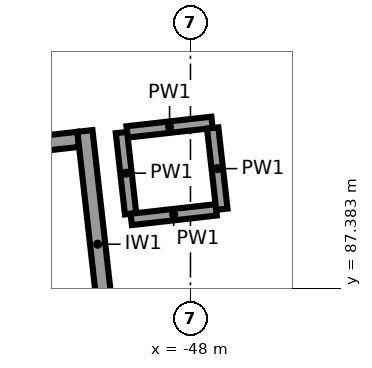
"""IFC4 building model, lengths in metres.
Left out: names, types, materials, properties, quantities, classifications, styles, units other than length and angle.
Written with IfcOpenShell. Run it as: python <this file> out.ifc"""

import sys

from ifc_helpers import new_model, si_unit, direction, frame, frame_2d, origin, place, context, subcontext, project, spatial, rectangle, extrude, element, save


model = new_model("IFC4")
c1 = context("Model", 3, precision=1e-05, world=origin(), true_north=direction((0.0, 1.0)))
c2 = subcontext(c1, "Body", "Model", "MODEL_VIEW")
j1 = project(units=[si_unit("LENGTHUNIT", "METRE"), si_unit("PLANEANGLEUNIT", "RADIAN")], contexts=[c1])
p1 = place(None, origin())
s1 = spatial("IfcSite", under=j1, at=p1, CompositionType="ELEMENT")
p2 = place(p1, origin())
s2 = spatial("IfcBuilding", under=s1, at=p2, CompositionType="ELEMENT")
p3 = place(p2, frame((0.0, 0.0, 6.5)))
s3 = spatial("IfcBuildingStorey", under=s2, at=p3, CompositionType="ELEMENT", Elevation=6.5)
p4 = place(p3, frame((-49.389, 89.454, 0.0), z_axis=(0.0, 0.0, 1.0), x_axis=(0.111976588553, -0.993710845073, 0.0)))
e1 = element("IfcWall", 1, at=p4, inside=s3, PredefinedType="SHEAR", context=c2, shape_type="SweptSolid", body=[
    extrude(rectangle(XDim=3.0, YDim=0.2, at=frame_2d((1.5, 0.0))), origin(), (0.0, 0.0, 1.0), 5.15),
])
p5 = place(p3, frame((-49.477, 89.343, 0.0), z_axis=(0.0, 0.0, 1.0), x_axis=(-0.993718105662, -0.11191213732, 0.0)))
e2 = element("IfcWall", 2, at=p5, inside=s3, PredefinedType="SHEAR", context=c2, shape_type="SweptSolid", body=[
    extrude(rectangle(XDim=1.9, YDim=0.2, at=frame_2d((0.95, 0.0))), origin(), (0.0, 0.0, 1.0), 5.15),
])
p6 = place(p3, frame((-47.716, 89.567, 0.0), z_axis=(0.0, 0.0, 1.0), x_axis=(-0.993710504932, -0.11197960702, 0.0)))
e3 = element("IfcWall", 3, at=p6, inside=s3, PredefinedType="PARTITIONING", context=c2, shape_type="SweptSolid", body=[
    extrude(rectangle(XDim=1.125, YDim=0.15, at=frame_2d((0.562, 0.0))), origin(), (0.0, 0.0, 1.0), 5.15),
])
p7 = place(p3, frame((-48.908, 89.432, 0.0), z_axis=(0.0, 0.0, 1.0), x_axis=(0.111951742856, -0.993713644503, 0.0)))
e4 = element("IfcWall", 4, at=p7, inside=s3, PredefinedType="PARTITIONING", context=c2, shape_type="SweptSolid", body=[
    extrude(rectangle(XDim=1.075, YDim=0.15, at=frame_2d((0.538, 0.0))), origin(), (0.0, 0.0, 1.0), 5.15),
])
p8 = place(p3, frame((-48.78, 88.29, 0.0), z_axis=(0.0, 0.0, 1.0), x_axis=(0.993710504932, 0.11197960702, 0.0)))
e5 = element("IfcWall", 5, at=p8, inside=s3, PredefinedType="PARTITIONING", context=c2, shape_type="SweptSolid", body=[
    extrude(rectangle(XDim=1.125, YDim=0.15, at=frame_2d((0.562, 0.0))), origin(), (0.0, 0.0, 1.0), 5.15),
])
p9 = place(p3, frame((-47.587, 88.424, 0.0), z_axis=(0.0, 0.0, 1.0), x_axis=(-0.111951742856, 0.993713644503, 0.0)))
e6 = element("IfcWall", 6, at=p9, inside=s3, PredefinedType="PARTITIONING", context=c2, shape_type="SweptSolid", body=[
    extrude(rectangle(XDim=1.075, YDim=0.15, at=frame_2d((0.538, 0.0))), origin(), (0.0, 0.0, 1.0), 5.15),
])
save(model, sys.argv[1])
